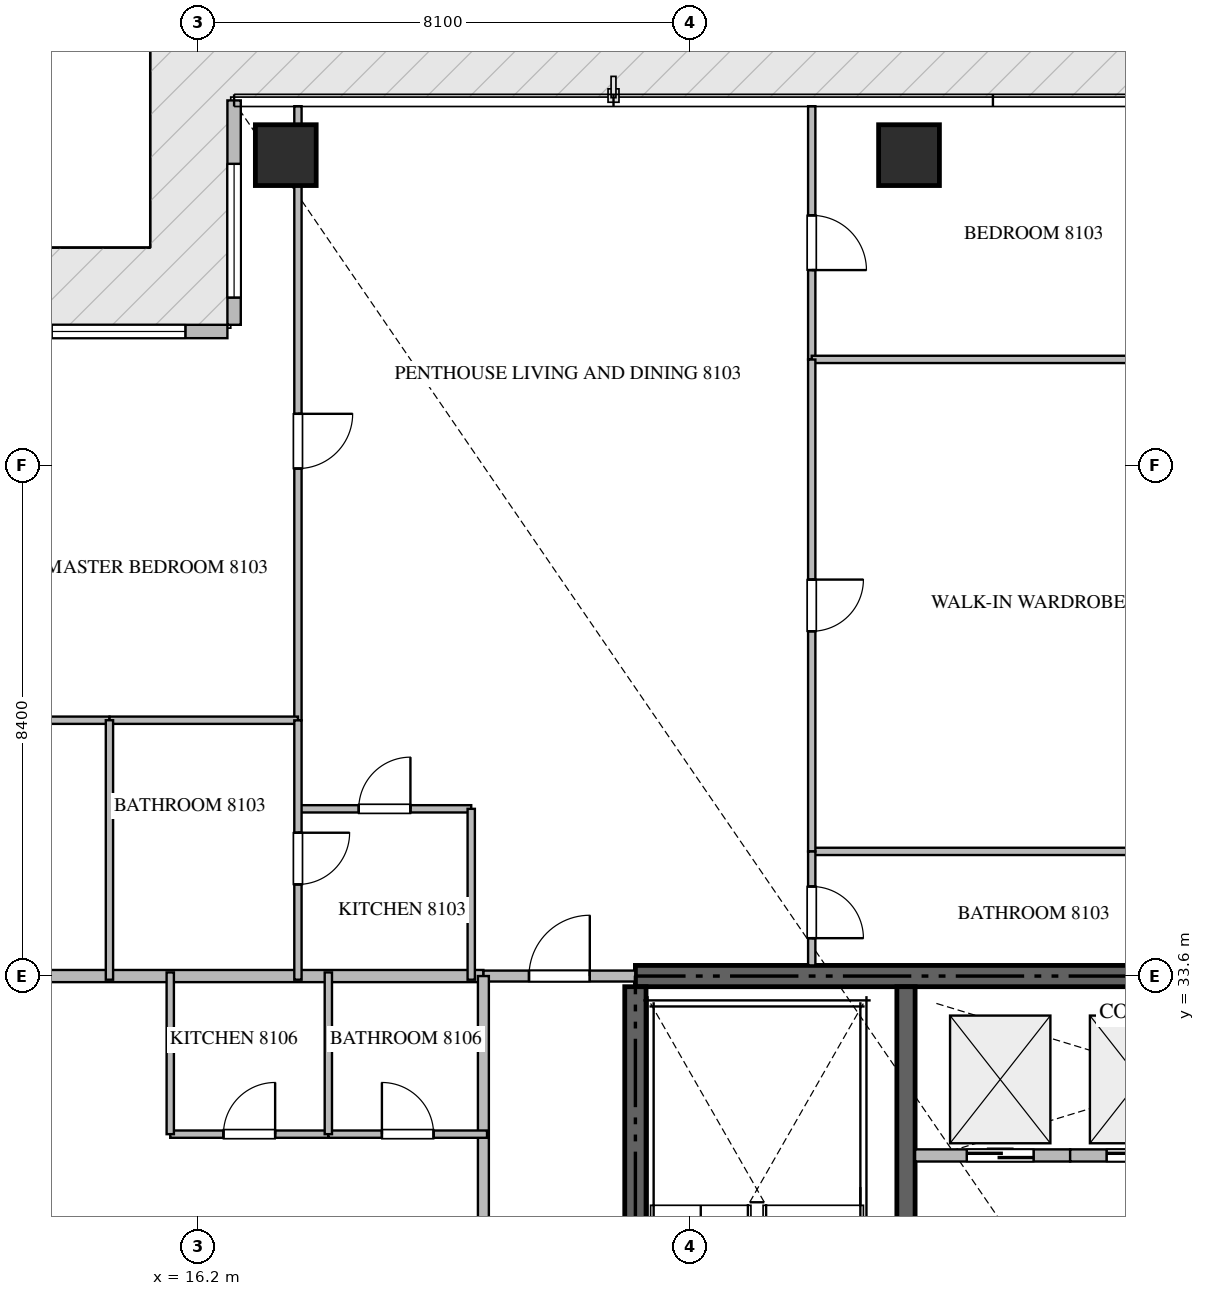
"""IFC4 building model, lengths in metres.
Left out: names, types, materials, properties, quantities, classifications, styles, units other than length and angle.
Written with IfcOpenShell. Run it as: python <this file> out.ifc"""

import sys

from ifc_helpers import new_model, si_unit, direction, frame, frame_2d, origin, origin_2d, place, context, subcontext, project, spatial, rectangle, extrude, source, transform, mapped, element, fill, save


model = new_model("IFC4")
c1 = context("Model", 3, precision=1e-05, world=origin(), true_north=direction((0.0, 1.0)))
c2 = subcontext(c1, "Body", "Model", "MODEL_VIEW")
j1 = project(units=[si_unit("LENGTHUNIT", "METRE"), si_unit("PLANEANGLEUNIT", "RADIAN")], contexts=[c1])
p1 = place(None, origin())
s1 = spatial("IfcSite", under=j1, at=p1, CompositionType="ELEMENT")
p2 = place(p1, origin())
s2 = spatial("IfcBuilding", under=s1, at=p2, CompositionType="ELEMENT")
p3 = place(p2, frame((0.0, 0.0, 325.85)))
s3 = spatial("IfcBuildingStorey", under=s2, at=p3, CompositionType="ELEMENT", Elevation=325.85)
p4 = place(p3, frame((41.4, 33.6, -0.26), z_axis=(0.0, 0.0, 1.0), x_axis=(-1.0, 0.0, 0.0)))
e1 = element("IfcWall", 1, at=p4, inside=s3, PredefinedType="SHEAR", context=c2, shape_type="SweptSolid", body=[
    extrude(rectangle(XDim=18.0, YDim=0.35, at=frame_2d((9.0, 0.0))), origin(), (0.0, 0.0, 1.0), 4.048),
])
p5 = place(p3, frame((23.4, 24.25, -0.26), z_axis=(0.0, 0.0, 1.0), x_axis=(0.0, 1.0, 0.0)))
e2 = element("IfcWall", 2, at=p5, inside=s3, PredefinedType="SHEAR", context=c2, shape_type="SweptSolid", body=[
    extrude(rectangle(XDim=9.175, YDim=0.35, at=frame_2d((4.587, 0.0))), origin(), (0.0, 0.0, 1.0), 4.048),
])
p6 = place(p3, frame((27.85, 23.55, -0.26), z_axis=(0.0, 0.0, 1.0), x_axis=(0.0, 1.0, 0.0)))
e3 = element("IfcWall", 3, at=p6, inside=s3, PredefinedType="SHEAR", context=c2, shape_type="SweptSolid", body=[
    extrude(rectangle(XDim=9.875, YDim=0.3, at=frame_2d((4.938, 0.0))), origin(), (0.0, 0.0, 1.0), 4.048),
])
m1 = source(origin(), c2, "Body", "SweptSolid", [
    extrude(rectangle(XDim=1.0, YDim=1.0, at=origin_2d()), origin(), (0.0, 0.0, 1.0), 4.05),
])
for number, where, z_axis, x_axis in (
    (4, (17.65, 47.1, -0.26), (0.0, 0.0, 1.0), (1.0, 0.0, 0.0)),
    (5, (27.9, 47.1, -0.26), (0.0, 0.0, 1.0), (1.0, 0.0, 0.0)),
):
    element("IfcColumn", number, at=place(p3, frame(where, z_axis=z_axis, x_axis=x_axis)), inside=s3, PredefinedType="COLUMN", context=c2, shape_type="MappedRepresentation", body=[
        mapped(m1, transform((0.0, 0.0, 0.0), scale=1.0)),
    ])
p7 = place(p3, frame((16.8, 48.0, 0.0), z_axis=(0.0, 0.0, 1.0), x_axis=(0.0, -1.0, 0.0)))
e6 = element("IfcWall", 6, at=p7, inside=s3, PredefinedType="ELEMENTEDWALL", context=c2, shape_type="SweptSolid", body=[
    extrude(rectangle(XDim=3.69, YDim=0.22, at=frame_2d((1.845, 0.0))), origin(), (0.0, 0.0, 1.0), 3.775),
])
p8 = place(p7, frame((1.043, 0.0, 0.65)))
e7 = element("IfcOpeningElement", 7, at=p8, cuts=e6, PredefinedType="OPENING", context=c2, shape_type="SweptSolid", body=[
    extrude(rectangle(XDim=2.2, YDim=2.4, at=frame_2d((1.1, 1.2))), frame((0.0, 0.12, 0.0), z_axis=(0.0, -1.0, 0.0), x_axis=(1.0, 0.0, 0.0)), (0.0, 0.0, 1.0), 0.24),
])
p9 = place(p3, frame((16.69, 44.2, 0.0), z_axis=(0.0, 0.0, 1.0), x_axis=(-1.0, 0.0, 0.0)))
e8 = element("IfcWall", 8, at=p9, inside=s3, PredefinedType="ELEMENTEDWALL", context=c2, shape_type="SweptSolid", body=[
    extrude(rectangle(XDim=3.58, YDim=0.22, at=frame_2d((1.79, 0.0))), origin(), (0.0, 0.0, 1.0), 3.775),
])
p10 = place(p9, frame((0.69, 0.0, 0.65)))
e9 = element("IfcOpeningElement", 9, at=p10, cuts=e8, PredefinedType="OPENING", context=c2, shape_type="SweptSolid", body=[
    extrude(rectangle(XDim=2.2, YDim=2.4, at=frame_2d((1.1, 1.2))), frame((0.0, 0.12, 0.0), z_axis=(0.0, -1.0, 0.0), x_axis=(1.0, 0.0, 0.0)), (0.0, 0.0, 1.0), 0.24),
])
p11 = place(p3, frame((28.0, 30.65, 0.0), z_axis=(0.0, 0.0, 1.0), x_axis=(1.0, 0.0, 0.0)))
e10 = element("IfcWall", 10, at=p11, inside=s3, PredefinedType="STANDARD", context=c2, shape_type="SweptSolid", body=[
    extrude(rectangle(XDim=2.55, YDim=0.2, at=frame_2d((1.275, 0.0))), origin(), (0.0, 0.0, 1.0), 3.79),
])
p12 = place(p11, frame((0.85, 0.0, 0.0)))
e11 = element("IfcOpeningElement", 11, at=p12, cuts=e10, PredefinedType="OPENING", context=c2, shape_type="SweptSolid", body=[
    extrude(rectangle(XDim=1.1, YDim=2.2, at=frame_2d((0.55, 1.1))), frame((0.0, 0.11, 0.0), z_axis=(0.0, -1.0, 0.0), x_axis=(1.0, 0.0, 0.0)), (0.0, 0.0, 1.0), 0.22),
])
p13 = place(p3, frame((30.55, 30.65, 0.0), z_axis=(0.0, 0.0, 1.0), x_axis=(1.0, 0.0, 0.0)))
e12 = element("IfcWall", 12, at=p13, inside=s3, PredefinedType="STANDARD", context=c2, shape_type="SweptSolid", body=[
    extrude(rectangle(XDim=2.3, YDim=0.2, at=frame_2d((1.15, 0.0))), origin(), (0.0, 0.0, 1.0), 3.79),
])
p14 = place(p13, frame((0.6, 0.0, 0.0)))
e13 = element("IfcOpeningElement", 13, at=p14, cuts=e12, PredefinedType="OPENING", context=c2, shape_type="SweptSolid", body=[
    extrude(rectangle(XDim=1.1, YDim=2.2, at=frame_2d((0.55, 1.1))), frame((0.0, 0.11, 0.0), z_axis=(0.0, -1.0, 0.0), x_axis=(1.0, 0.0, 0.0)), (0.0, 0.0, 1.0), 0.22),
])
p15 = place(p3, frame((9.282, 33.6, 0.0), z_axis=(0.0, 0.0, 1.0), x_axis=(1.0, 0.0, 0.0)))
e14 = element("IfcWall", 14, at=p15, inside=s3, PredefinedType="PARTITIONING", context=c2, shape_type="SweptSolid", body=[
    extrude(rectangle(XDim=11.618, YDim=0.2, at=frame_2d((5.809, 0.0))), origin(), (0.0, 0.0, 1.0), 3.79),
])
p16 = place(p3, frame((20.902, 33.6, 0.0), z_axis=(0.0, 0.0, 1.0), x_axis=(1.0, 0.0, 0.0)))
e15 = element("IfcWall", 15, at=p16, inside=s3, PredefinedType="PARTITIONING", context=c2, shape_type="SweptSolid", body=[
    extrude(rectangle(XDim=2.496, YDim=0.18, at=frame_2d((1.248, 0.0))), origin(), (0.0, 0.0, 1.0), 3.79),
])
p17 = place(p16, frame((0.748, 0.0, 0.0)))
e16 = element("IfcOpeningElement", 16, at=p17, cuts=e15, PredefinedType="OPENING", context=c2, shape_type="SweptSolid", body=[
    extrude(rectangle(XDim=1.0, YDim=2.15, at=frame_2d((0.5, 1.075))), frame((0.0, 0.1, 0.0), z_axis=(0.0, -1.0, 0.0), x_axis=(1.0, 0.0, 0.0)), (0.0, 0.0, 1.0), 0.2),
])
p18 = place(p3, frame((20.9, 16.8, 0.0), z_axis=(0.0, 0.0, 1.0), x_axis=(0.0, 1.0, 0.0)))
e17 = element("IfcWall", 17, at=p18, inside=s3, PredefinedType="PARTITIONING", context=c2, shape_type="SweptSolid", body=[
    extrude(rectangle(XDim=16.8, YDim=0.18, at=frame_2d((8.4, 0.0))), origin(), (0.0, 0.0, 1.0), 3.79),
])
p19 = place(p18, frame((2.67, 0.0, 0.0)))
e18 = element("IfcOpeningElement", 18, at=p19, cuts=e17, PredefinedType="OPENING", context=c2, shape_type="SweptSolid", body=[
    extrude(rectangle(XDim=1.0, YDim=2.15, at=frame_2d((0.5, 1.075))), frame((0.0, 0.1, 0.0), z_axis=(0.0, -1.0, 0.0), x_axis=(1.0, 0.0, 0.0)), (0.0, 0.0, 1.0), 0.2),
])
p20 = place(p18, frame((11.107, 0.0, 0.0)))
e19 = element("IfcOpeningElement", 19, at=p20, cuts=e17, PredefinedType="OPENING", context=c2, shape_type="SweptSolid", body=[
    extrude(rectangle(XDim=1.0, YDim=2.15, at=frame_2d((0.5, 1.075))), frame((0.0, 0.1, 0.0), z_axis=(0.0, -1.0, 0.0), x_axis=(1.0, 0.0, 0.0)), (0.0, 0.0, 1.0), 0.2),
])
p21 = place(p3, frame((17.85, 36.35, 0.0), z_axis=(0.0, 0.0, 1.0), x_axis=(1.0, 0.0, 0.0)))
e20 = element("IfcWall", 20, at=p21, inside=s3, PredefinedType="PARTITIONING", context=c2, shape_type="SweptSolid", body=[
    extrude(rectangle(XDim=2.85, YDim=0.12, at=frame_2d((1.425, 0.0))), origin(), (0.0, 0.0, 1.0), 3.472),
])
p22 = place(p21, frame((1.0, 0.0, 0.0)))
e21 = element("IfcOpeningElement", 21, at=p22, cuts=e20, PredefinedType="OPENING", context=c2, shape_type="SweptSolid", body=[
    extrude(rectangle(XDim=0.85, YDim=2.1, at=frame_2d((0.425, 1.05))), frame((0.0, 0.07, 0.0), z_axis=(0.0, -1.0, 0.0), x_axis=(1.0, 0.0, 0.0)), (0.0, 0.0, 1.0), 0.14),
])
p23 = place(p3, frame((20.7, 36.35, 0.0), z_axis=(0.0, 0.0, 1.0), x_axis=(0.0, -1.0, 0.0)))
e22 = element("IfcWall", 22, at=p23, inside=s3, PredefinedType="PARTITIONING", context=c2, shape_type="SweptSolid", body=[
    extrude(rectangle(XDim=2.81, YDim=0.12, at=frame_2d((1.405, 0.0))), origin(), (0.0, 0.0, 1.0), 3.79),
])
p24 = place(p3, frame((17.85, 47.905, 0.0), z_axis=(0.0, 0.0, 1.0), x_axis=(0.0, -1.0, 0.0)))
e23 = element("IfcWall", 23, at=p24, inside=s3, PredefinedType="PARTITIONING", context=c2, shape_type="SweptSolid", body=[
    extrude(rectangle(XDim=10.098, YDim=0.12, at=frame_2d((5.049, 0.0))), origin(), (0.0, 0.0, 1.0), 3.292),
])
p25 = place(p24, frame((5.059, 0.0, 0.0)))
e24 = element("IfcOpeningElement", 24, at=p25, cuts=e23, PredefinedType="OPENING", context=c2, shape_type="SweptSolid", body=[
    extrude(rectangle(XDim=0.9, YDim=2.1, at=frame_2d((0.45, 1.05))), frame((0.0, 0.07, 0.0), z_axis=(0.0, -1.0, 0.0), x_axis=(1.0, 0.0, 0.0)), (0.0, 0.0, 1.0), 0.14),
])
p26 = place(p3, frame((9.295, 37.807, 0.0), z_axis=(0.0, 0.0, 1.0), x_axis=(1.0, 0.0, 0.0)))
e25 = element("IfcWall", 25, at=p26, inside=s3, PredefinedType="PARTITIONING", context=c2, shape_type="SweptSolid", body=[
    extrude(rectangle(XDim=5.455, YDim=0.12, at=frame_2d((2.728, 0.0))), origin(), (0.0, 0.0, 1.0), 3.79),
])
p27 = place(p26, frame((3.224, 0.0, 0.0)))
e26 = element("IfcOpeningElement", 26, at=p27, cuts=e25, PredefinedType="OPENING", context=c2, shape_type="SweptSolid", body=[
    extrude(rectangle(XDim=0.85, YDim=2.1, at=frame_2d((0.425, 1.05))), frame((0.0, 0.07, 0.0), z_axis=(0.0, -1.0, 0.0), x_axis=(1.0, 0.0, 0.0)), (0.0, 0.0, 1.0), 0.14),
])
p28 = place(p3, frame((14.752, 37.807, 0.0), z_axis=(0.0, 0.0, 1.0), x_axis=(1.0, 0.0, 0.0)))
e27 = element("IfcWall", 27, at=p28, inside=s3, PredefinedType="PARTITIONING", context=c2, shape_type="SweptSolid", body=[
    extrude(rectangle(XDim=3.098, YDim=0.12, at=frame_2d((1.549, 0.0))), origin(), (0.0, 0.0, 1.0), 3.79),
])
p29 = place(p3, frame((14.75, 37.807, 0.0), z_axis=(0.0, 0.0, 1.0), x_axis=(0.0, -1.0, 0.0)))
e28 = element("IfcWall", 28, at=p29, inside=s3, PredefinedType="PARTITIONING", context=c2, shape_type="SweptSolid", body=[
    extrude(rectangle(XDim=4.267, YDim=0.12, at=frame_2d((2.133, 0.0))), origin(), (0.0, 0.0, 1.0), 3.79),
])
p30 = place(p3, frame((17.85, 37.805, 0.0), z_axis=(0.0, 0.0, 1.0), x_axis=(0.0, -1.0, 0.0)))
e29 = element("IfcWall", 29, at=p30, inside=s3, PredefinedType="PARTITIONING", context=c2, shape_type="SweptSolid", body=[
    extrude(rectangle(XDim=4.265, YDim=0.12, at=frame_2d((2.132, 0.0))), origin(), (0.0, 0.0, 1.0), 3.372),
])
p31 = place(p30, frame((1.848, 0.0, 0.0)))
e30 = element("IfcOpeningElement", 30, at=p31, cuts=e29, PredefinedType="OPENING", context=c2, shape_type="SweptSolid", body=[
    extrude(rectangle(XDim=0.85, YDim=2.1, at=frame_2d((0.425, 1.05))), frame((0.0, 0.07, 0.0), z_axis=(0.0, -1.0, 0.0), x_axis=(1.0, 0.0, 0.0)), (0.0, 0.0, 1.0), 0.14),
])
p32 = place(p3, frame((26.3, 47.905, 0.0), z_axis=(0.0, 0.0, 1.0), x_axis=(0.0, -1.0, 0.0)))
e31 = element("IfcWall", 31, at=p32, inside=s3, PredefinedType="PARTITIONING", context=c2, shape_type="SweptSolid", body=[
    extrude(rectangle(XDim=4.164, YDim=0.12, at=frame_2d((2.082, 0.0))), origin(), (0.0, 0.0, 1.0), 3.79),
])
p33 = place(p32, frame((1.795, 0.0, 0.0)))
e32 = element("IfcOpeningElement", 32, at=p33, cuts=e31, PredefinedType="OPENING", context=c2, shape_type="SweptSolid", body=[
    extrude(rectangle(XDim=0.9, YDim=2.1, at=frame_2d((0.45, 1.05))), frame((0.0, 0.07, 0.0), z_axis=(0.0, -1.0, 0.0), x_axis=(1.0, 0.0, 0.0)), (0.0, 0.0, 1.0), 0.14),
])
for number, where, z_axis, x_axis in (
    (33, (26.3, 43.741, 0.0), (0.0, 0.0, 1.0), (1.0, 0.0, 0.0)),
    (34, (26.3, 35.65, 0.0), (0.0, 0.0, 1.0), (1.0, 0.0, 0.0)),
):
    element("IfcWall", number, at=place(p3, frame(where, z_axis=z_axis, x_axis=x_axis)), inside=s3, PredefinedType="PARTITIONING", context=c2, shape_type="SweptSolid", body=[
        extrude(rectangle(XDim=7.36, YDim=0.12, at=frame_2d((3.68, 0.0))), origin(), (0.0, 0.0, 1.0), 3.79),
    ])
p34 = place(p3, frame((26.3, 43.739, 0.0), z_axis=(0.0, 0.0, 1.0), x_axis=(0.0, -1.0, 0.0)))
e35 = element("IfcWall", 35, at=p34, inside=s3, PredefinedType="PARTITIONING", context=c2, shape_type="SweptSolid", body=[
    extrude(rectangle(XDim=8.089, YDim=0.12, at=frame_2d((4.044, 0.0))), origin(), (0.0, 0.0, 1.0), 3.79),
])
p35 = place(p34, frame((3.619, 0.0, 0.0)))
e36 = element("IfcOpeningElement", 36, at=p35, cuts=e35, PredefinedType="OPENING", context=c2, shape_type="SweptSolid", body=[
    extrude(rectangle(XDim=0.85, YDim=2.1, at=frame_2d((0.425, 1.05))), frame((0.0, 0.07, 0.0), z_axis=(0.0, -1.0, 0.0), x_axis=(1.0, 0.0, 0.0)), (0.0, 0.0, 1.0), 0.14),
])
p36 = place(p3, frame((26.3, 35.648, 0.0), z_axis=(0.0, 0.0, 1.0), x_axis=(0.0, -1.0, 0.0)))
e37 = element("IfcWall", 37, at=p36, inside=s3, PredefinedType="PARTITIONING", context=c2, shape_type="SweptSolid", body=[
    extrude(rectangle(XDim=1.873, YDim=0.12, at=frame_2d((0.937, 0.0))), origin(), (0.0, 0.0, 1.0), 3.79),
])
p37 = place(p36, frame((0.575, 0.0, 0.0)))
e38 = element("IfcOpeningElement", 38, at=p37, cuts=e37, PredefinedType="OPENING", context=c2, shape_type="SweptSolid", body=[
    extrude(rectangle(XDim=0.85, YDim=2.1, at=frame_2d((0.425, 1.05))), frame((0.0, 0.07, 0.0), z_axis=(0.0, -1.0, 0.0), x_axis=(1.0, 0.0, 0.0)), (0.0, 0.0, 1.0), 0.14),
])
p38 = place(p3, frame((15.75, 31.0, 0.0), z_axis=(0.0, 0.0, 1.0), x_axis=(1.0, 0.0, 0.0)))
e39 = element("IfcWall", 39, at=p38, inside=s3, PredefinedType="PARTITIONING", context=c2, shape_type="SweptSolid", body=[
    extrude(rectangle(XDim=2.6, YDim=0.12, at=frame_2d((1.3, 0.0))), origin(), (0.0, 0.0, 1.0), 3.79),
])
p39 = place(p38, frame((0.875, 0.0, 0.0)))
e40 = element("IfcOpeningElement", 40, at=p39, cuts=e39, PredefinedType="OPENING", context=c2, shape_type="SweptSolid", body=[
    extrude(rectangle(XDim=0.85, YDim=2.1, at=frame_2d((0.425, 1.05))), frame((0.0, 0.07, 0.0), z_axis=(0.0, -1.0, 0.0), x_axis=(1.0, 0.0, 0.0)), (0.0, 0.0, 1.0), 0.14),
])
p40 = place(p3, frame((18.352, 31.0, 0.0), z_axis=(0.0, 0.0, 1.0), x_axis=(1.0, 0.0, 0.0)))
e41 = element("IfcWall", 41, at=p40, inside=s3, PredefinedType="PARTITIONING", context=c2, shape_type="SweptSolid", body=[
    extrude(rectangle(XDim=2.608, YDim=0.12, at=frame_2d((1.304, 0.0))), origin(), (0.0, 0.0, 1.0), 3.79),
])
p41 = place(p40, frame((0.879, 0.0, 0.0)))
e42 = element("IfcOpeningElement", 42, at=p41, cuts=e41, PredefinedType="OPENING", context=c2, shape_type="SweptSolid", body=[
    extrude(rectangle(XDim=0.85, YDim=2.1, at=frame_2d((0.425, 1.05))), frame((0.0, 0.07, 0.0), z_axis=(0.0, -1.0, 0.0), x_axis=(1.0, 0.0, 0.0)), (0.0, 0.0, 1.0), 0.14),
])
for number, where, z_axis, x_axis in (
    (43, (18.35, 31.0, 0.0), (0.0, 0.0, 1.0), (0.0, 1.0, 0.0)),
    (44, (15.75, 31.0, 0.0), (0.0, 0.0, 1.0), (0.0, 1.0, 0.0)),
):
    element("IfcWall", number, at=place(p3, frame(where, z_axis=z_axis, x_axis=x_axis)), inside=s3, PredefinedType="PARTITIONING", context=c2, shape_type="SweptSolid", body=[
        extrude(rectangle(XDim=2.66, YDim=0.12, at=frame_2d((1.33, 0.0))), origin(), (0.0, 0.0, 1.0), 3.79),
    ])
m2 = source(origin(), c2, "Body", "SweptSolid", [
    extrude(rectangle(XDim=2.2, YDim=2.4, at=frame_2d((1.1, 1.2))), frame((0.0, 0.03, 0.0), z_axis=(0.0, -1.0, 0.0), x_axis=(1.0, 0.0, 0.0)), (0.0, 0.0, 1.0), 0.06),
])
p42 = place(p8, origin())
e45 = element("IfcWindow", 45, at=p42, inside=s3, PartitioningType="SINGLE_PANEL", PredefinedType="WINDOW", context=c2, shape_type="MappedRepresentation", body=[
    mapped(m2, transform((0.0, 0.0, 0.0), scale=1.0)),
])
fill(e7, e45)
p43 = place(p10, origin())
e46 = element("IfcWindow", 46, at=p43, inside=s3, PartitioningType="SINGLE_PANEL", PredefinedType="WINDOW", context=c2, shape_type="MappedRepresentation", body=[
    mapped(m2, transform((0.0, 0.0, 0.0), scale=1.0)),
])
fill(e9, e46)
m3 = source(origin(), c2, "Body", "SweptSolid", [
    extrude(rectangle(XDim=1.1, YDim=2.2, at=frame_2d((0.55, 1.1))), frame((0.0, 0.025, 0.0), z_axis=(0.0, -1.0, 0.0), x_axis=(1.0, 0.0, 0.0)), (0.0, 0.0, 1.0), 0.05),
])
p44 = place(p12, origin())
e47 = element("IfcDoor", 47, at=p44, inside=s3, OperationType="DOUBLE_DOOR_SLIDING", PredefinedType="DOOR", context=c2, shape_type="MappedRepresentation", body=[
    mapped(m3, transform((0.0, 0.0, 0.0), scale=1.0)),
])
fill(e11, e47)
p45 = place(p14, origin())
e48 = element("IfcDoor", 48, at=p45, inside=s3, OperationType="DOUBLE_DOOR_SLIDING", PredefinedType="DOOR", context=c2, shape_type="MappedRepresentation", body=[
    mapped(m3, transform((0.0, 0.0, 0.0), scale=1.0)),
])
fill(e13, e48)
m4 = source(origin(), c2, "Body", "SweptSolid", [
    extrude(rectangle(XDim=1.0, YDim=2.15, at=frame_2d((0.5, 1.075))), frame((0.0, 0.025, 0.0), z_axis=(0.0, -1.0, 0.0), x_axis=(1.0, 0.0, 0.0)), (0.0, 0.0, 1.0), 0.05),
])
p46 = place(p17, origin())
e49 = element("IfcDoor", 49, at=p46, inside=s3, OperationType="SINGLE_SWING_RIGHT", PredefinedType="DOOR", context=c2, shape_type="MappedRepresentation", body=[
    mapped(m4, transform((0.0, 0.0, 0.0), scale=1.0)),
])
fill(e16, e49)
m5 = source(origin(), c2, "Body", "SweptSolid", [
    extrude(rectangle(XDim=0.85, YDim=2.1, at=frame_2d((0.425, 1.05))), frame((0.0, 0.025, 0.0), z_axis=(0.0, -1.0, 0.0), x_axis=(1.0, 0.0, 0.0)), (0.0, 0.0, 1.0), 0.05),
])
p47 = place(p22, origin())
e50 = element("IfcDoor", 50, at=p47, inside=s3, OperationType="SINGLE_SWING_RIGHT", PredefinedType="DOOR", context=c2, shape_type="MappedRepresentation", body=[
    mapped(m5, transform((0.0, 0.0, 0.0), scale=1.0)),
])
fill(e21, e50)
m6 = source(origin(), c2, "Body", "SweptSolid", [
    extrude(rectangle(XDim=0.9, YDim=2.1, at=frame_2d((0.45, 1.05))), frame((0.0, 0.025, 0.0), z_axis=(0.0, -1.0, 0.0), x_axis=(1.0, 0.0, 0.0)), (0.0, 0.0, 1.0), 0.05),
])
p48 = place(p25, origin())
e51 = element("IfcDoor", 51, at=p48, inside=s3, OperationType="SINGLE_SWING_LEFT", PredefinedType="DOOR", context=c2, shape_type="MappedRepresentation", body=[
    mapped(m6, transform((0.0, 0.0, 0.0), scale=1.0)),
])
fill(e24, e51)
p49 = place(p31, origin())
e52 = element("IfcDoor", 52, at=p49, inside=s3, OperationType="SINGLE_SWING_LEFT", PredefinedType="DOOR", context=c2, shape_type="MappedRepresentation", body=[
    mapped(m5, transform((0.0, 0.0, 0.0), scale=1.0)),
])
fill(e30, e52)
p50 = place(p33, origin())
e53 = element("IfcDoor", 53, at=p50, inside=s3, OperationType="SINGLE_SWING_RIGHT", PredefinedType="DOOR", context=c2, shape_type="MappedRepresentation", body=[
    mapped(m6, transform((0.0, 0.0, 0.0), scale=1.0)),
])
fill(e32, e53)
p51 = place(p35, origin())
e54 = element("IfcDoor", 54, at=p51, inside=s3, OperationType="SINGLE_SWING_LEFT", PredefinedType="DOOR", context=c2, shape_type="MappedRepresentation", body=[
    mapped(m5, transform((0.0, 0.0, 0.0), scale=1.0)),
])
fill(e36, e54)
p52 = place(p37, origin())
e55 = element("IfcDoor", 55, at=p52, inside=s3, OperationType="SINGLE_SWING_RIGHT", PredefinedType="DOOR", context=c2, shape_type="MappedRepresentation", body=[
    mapped(m5, transform((0.0, 0.0, 0.0), scale=1.0)),
])
fill(e38, e55)
p53 = place(p39, origin())
e56 = element("IfcDoor", 56, at=p53, inside=s3, OperationType="SINGLE_SWING_RIGHT", PredefinedType="DOOR", context=c2, shape_type="MappedRepresentation", body=[
    mapped(m5, transform((0.0, 0.0, 0.0), scale=1.0)),
])
fill(e40, e56)
p54 = place(p41, origin())
e57 = element("IfcDoor", 57, at=p54, inside=s3, OperationType="SINGLE_SWING_LEFT", PredefinedType="DOOR", context=c2, shape_type="MappedRepresentation", body=[
    mapped(m5, transform((0.0, 0.0, 0.0), scale=1.0)),
])
fill(e42, e57)
save(model, sys.argv[1])
